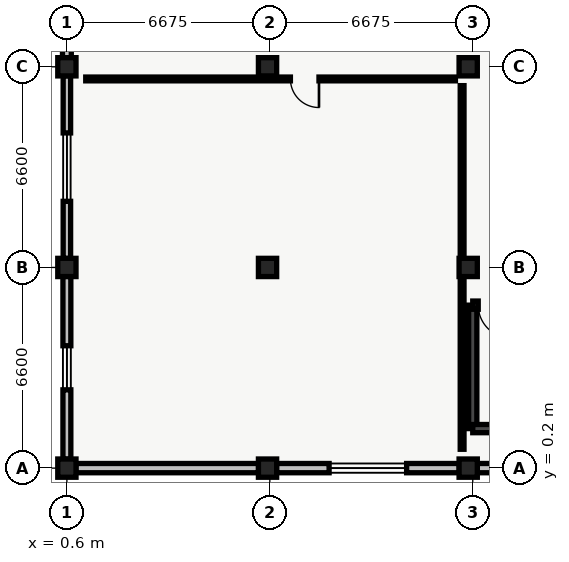
"""IFC4 building model, lengths in metres.
Left out: names, types, materials, properties, quantities, classifications, styles, units other than length and angle.
Written with IfcOpenShell. Run it as: python <this file> out.ifc"""

import sys

from ifc_helpers import new_model, si_unit, direction, frame, frame_2d, origin, origin_2d, place, context, subcontext, project, spatial, rectangle, extrude, element, fill, save


model = new_model("IFC4")
c1 = context("Model", 3, precision=1e-05, world=origin(), true_north=direction((0.0, 1.0)))
c2 = subcontext(c1, "Body", "Model", "MODEL_VIEW")
j1 = project(units=[si_unit("LENGTHUNIT", "METRE"), si_unit("PLANEANGLEUNIT", "RADIAN")], contexts=[c1])
p1 = place(None, origin())
s1 = spatial("IfcSite", under=j1, at=p1, CompositionType="ELEMENT")
p2 = place(p1, origin())
s2 = spatial("IfcBuilding", under=s1, at=p2, CompositionType="ELEMENT")
p3 = place(p2, frame((0.0, 0.0, 5.1)))
s3 = spatial("IfcBuildingStorey", under=s2, at=p3, CompositionType="ELEMENT", Elevation=5.1)
for number, where, z_axis, x_axis in (
    (1, (0.6, 0.2, 0.0), (0.0, 0.0, 1.0), (1.0, 0.0, 0.0)),
    (2, (0.6, 6.8, 0.0), (0.0, 0.0, 1.0), (1.0, 0.0, 0.0)),
    (3, (0.6, 13.4, 0.0), (0.0, 0.0, 1.0), (1.0, 0.0, 0.0)),
    (4, (7.2, 0.2, 0.0), (0.0, 0.0, 1.0), (1.0, 0.0, 0.0)),
    (5, (7.2, 6.8, 0.0), (0.0, 0.0, 1.0), (1.0, 0.0, 0.0)),
    (6, (7.2, 13.4, 0.0), (0.0, 0.0, 1.0), (1.0, 0.0, 0.0)),
    (7, (13.8, 0.2, 0.0), (0.0, 0.0, 1.0), (1.0, 0.0, 0.0)),
    (8, (13.8, 6.8, 0.0), (0.0, 0.0, 1.0), (1.0, 0.0, 0.0)),
    (9, (13.8, 13.4, 0.0), (0.0, 0.0, 1.0), (1.0, 0.0, 0.0)),
):
    element("IfcColumn", number, at=place(p3, frame(where, z_axis=z_axis, x_axis=x_axis)), inside=s3, PredefinedType="COLUMN", context=c2, shape_type="SweptSolid", body=[
        extrude(rectangle(XDim=0.6, YDim=0.6, at=origin_2d()), origin(), (0.0, 0.0, 1.0), 4.3),
    ])
p4 = place(p3, frame((0.6, 0.495, 0.0), z_axis=(0.0, 0.0, 1.0), x_axis=(0.0, 1.0, 0.0)))
e10 = element("IfcWall", 10, at=p4, inside=s3, PredefinedType="STANDARD", context=c2, shape_type="SweptSolid", body=[
    extrude(rectangle(XDim=6.01, YDim=0.26, at=frame_2d((3.005, 0.0))), origin(), (0.0, 0.0, 1.0), 3.785),
])
p5 = place(p4, frame((2.28, 0.0, 0.95)))
e11 = element("IfcOpeningElement", 11, at=p5, cuts=e10, PredefinedType="OPENING", context=c2, shape_type="SweptSolid", body=[
    extrude(rectangle(XDim=1.45, YDim=1.35, at=frame_2d((0.725, 0.675))), frame((0.0, 0.13, 0.0), z_axis=(0.0, -1.0, 0.0), x_axis=(1.0, 0.0, 0.0)), (0.0, 0.0, 1.0), 0.26),
])
p6 = place(p3, frame((0.6, 7.095, 0.0), z_axis=(0.0, 0.0, 1.0), x_axis=(0.0, 1.0, 0.0)))
e12 = element("IfcWall", 12, at=p6, inside=s3, PredefinedType="STANDARD", context=c2, shape_type="SweptSolid", body=[
    extrude(rectangle(XDim=6.01, YDim=0.245, at=frame_2d((3.005, 0.0))), origin(), (0.0, 0.0, 1.0), 3.785),
])
p7 = place(p6, frame((1.88, 0.0, 0.95)))
e13 = element("IfcOpeningElement", 13, at=p7, cuts=e12, PredefinedType="OPENING", context=c2, shape_type="SweptSolid", body=[
    extrude(rectangle(XDim=2.25, YDim=1.55, at=frame_2d((1.125, 0.775))), frame((0.0, 0.123, 0.0), z_axis=(0.0, -1.0, 0.0), x_axis=(1.0, 0.0, 0.0)), (0.0, 0.0, 1.0), 0.245),
])
p8 = place(p3, frame((0.6, 13.695, 0.0), z_axis=(0.0, 0.0, 1.0), x_axis=(0.0, 1.0, 0.0)))
e14 = element("IfcWall", 14, at=p8, inside=s3, PredefinedType="STANDARD", context=c2, shape_type="SweptSolid", body=[
    extrude(rectangle(XDim=6.01, YDim=0.29, at=frame_2d((3.005, 0.0))), origin(), (0.0, 0.0, 1.0), 3.785),
])
p9 = place(p8, frame((1.73, 0.0, 0.95)))
e15 = element("IfcOpeningElement", 15, at=p9, cuts=e14, PredefinedType="OPENING", context=c2, shape_type="SweptSolid", body=[
    extrude(rectangle(XDim=2.55, YDim=1.75, at=frame_2d((1.275, 0.875))), frame((0.0, 0.145, 0.0), z_axis=(0.0, -1.0, 0.0), x_axis=(1.0, 0.0, 0.0)), (0.0, 0.0, 1.0), 0.29),
])
p10 = place(p3, frame((20.105, 0.2, 0.0), z_axis=(0.0, 0.0, 1.0), x_axis=(-1.0, 0.0, 0.0)))
e16 = element("IfcWall", 16, at=p10, inside=s3, PredefinedType="STANDARD", context=c2, shape_type="SweptSolid", body=[
    extrude(rectangle(XDim=6.01, YDim=0.305, at=frame_2d((3.005, 0.0))), origin(), (0.0, 0.0, 1.0), 3.785),
])
p11 = place(p3, frame((13.505, 0.2, 0.0), z_axis=(0.0, 0.0, 1.0), x_axis=(-1.0, 0.0, 0.0)))
e17 = element("IfcWall", 17, at=p11, inside=s3, PredefinedType="STANDARD", context=c2, shape_type="SweptSolid", body=[
    extrude(rectangle(XDim=6.01, YDim=0.305, at=frame_2d((3.005, 0.0))), origin(), (0.0, 0.0, 1.0), 3.785),
])
p12 = place(p11, frame((1.73, 0.0, 0.95)))
e18 = element("IfcOpeningElement", 18, at=p12, cuts=e17, PredefinedType="OPENING", context=c2, shape_type="SweptSolid", body=[
    extrude(rectangle(XDim=2.55, YDim=1.75, at=frame_2d((1.275, 0.875))), frame((0.0, 0.152, 0.0), z_axis=(0.0, -1.0, 0.0), x_axis=(1.0, 0.0, 0.0)), (0.0, 0.0, 1.0), 0.305),
])
p13 = place(p3, frame((6.905, 0.2, 0.0), z_axis=(0.0, 0.0, 1.0), x_axis=(-1.0, 0.0, 0.0)))
e19 = element("IfcWall", 19, at=p13, inside=s3, PredefinedType="STANDARD", context=c2, shape_type="SweptSolid", body=[
    extrude(rectangle(XDim=6.01, YDim=0.305, at=frame_2d((3.005, 0.0))), origin(), (0.0, 0.0, 1.0), 3.785),
])
p14 = place(p3, frame((13.95, 1.5, 0.0), z_axis=(0.0, 0.0, 1.0), x_axis=(0.0, 1.0, 0.0)))
e20 = element("IfcWall", 20, at=p14, inside=s3, PredefinedType="SHEAR", context=c2, shape_type="SweptSolid", body=[
    extrude(rectangle(XDim=4.06, YDim=0.27, at=frame_2d((2.03, 0.0))), origin(), (0.0, 0.0, 1.0), 4.28),
])
p15 = place(p3, frame((13.95, 5.56, 0.0), z_axis=(0.0, 0.0, 1.0), x_axis=(1.0, 0.0, 0.0)))
e21 = element("IfcWall", 21, at=p15, inside=s3, PredefinedType="SHEAR", context=c2, shape_type="SweptSolid", body=[
    extrude(rectangle(XDim=7.47, YDim=0.27, at=frame_2d((3.735, 0.0))), origin(), (0.0, 0.0, 1.0), 4.28),
])
p16 = place(p15, frame((0.18, 0.0, 0.0)))
e22 = element("IfcOpeningElement", 22, at=p16, cuts=e21, PredefinedType="OPENING", context=c2, shape_type="SweptSolid", body=[
    extrude(rectangle(XDim=1.08, YDim=2.15, at=frame_2d((0.54, 1.075))), frame((0.0, 0.135, 0.0), z_axis=(0.0, -1.0, 0.0), x_axis=(1.0, 0.0, 0.0)), (0.0, 0.0, 1.0), 0.27),
])
p17 = place(p3, frame((21.42, 1.5, 0.0), z_axis=(0.0, 0.0, 1.0), x_axis=(-1.0, 0.0, 0.0)))
e23 = element("IfcWall", 23, at=p17, inside=s3, PredefinedType="SHEAR", context=c2, shape_type="SweptSolid", body=[
    extrude(rectangle(XDim=7.47, YDim=0.27, at=frame_2d((3.735, 0.0))), origin(), (0.0, 0.0, 1.0), 4.28),
])
p18 = place(p3, frame((13.6, 0.82, 0.0), z_axis=(0.0, 0.0, 1.0), x_axis=(0.0, 1.0, 0.0)))
e24 = element("IfcWall", 24, at=p18, inside=s3, PredefinedType="PARTITIONING", context=c2, shape_type="SweptSolid", body=[
    extrude(rectangle(XDim=11.96, YDim=0.125, at=frame_2d((5.98, 0.0))), origin(), (0.0, 0.0, 1.0), 3.635),
])
p19 = place(p3, frame((13.38, 13.0, 0.0), z_axis=(0.0, 0.0, 1.0), x_axis=(-1.0, 0.0, 0.0)))
e25 = element("IfcWall", 25, at=p19, inside=s3, PredefinedType="PARTITIONING", context=c2, shape_type="SweptSolid", body=[
    extrude(rectangle(XDim=12.16, YDim=0.125, at=frame_2d((6.08, 0.0))), origin(), (0.0, 0.0, 1.0), 3.95),
])
p20 = place(p19, frame((4.488, 0.0, 0.0)))
e26 = element("IfcOpeningElement", 26, at=p20, cuts=e25, PredefinedType="OPENING", context=c2, shape_type="SweptSolid", body=[
    extrude(rectangle(XDim=0.94, YDim=2.12, at=frame_2d((0.47, 1.06))), frame((0.0, 0.062, 0.0), z_axis=(0.0, -1.0, 0.0), x_axis=(1.0, 0.0, 0.0)), (0.0, 0.0, 1.0), 0.125),
])
p21 = place(p5, origin())
e27 = element("IfcWindow", 27, at=p21, inside=s3, PartitioningType="SINGLE_PANEL", PredefinedType="WINDOW", context=c2, shape_type="SweptSolid", body=[
    extrude(rectangle(XDim=1.45, YDim=1.35, at=frame_2d((0.725, 0.675))), frame((0.0, 0.03, 0.0), z_axis=(0.0, -1.0, 0.0), x_axis=(1.0, 0.0, 0.0)), (0.0, 0.0, 1.0), 0.06),
])
fill(e11, e27)
p22 = place(p7, origin())
e28 = element("IfcWindow", 28, at=p22, inside=s3, PartitioningType="SINGLE_PANEL", PredefinedType="WINDOW", context=c2, shape_type="SweptSolid", body=[
    extrude(rectangle(XDim=2.25, YDim=1.55, at=frame_2d((1.125, 0.775))), frame((0.0, 0.03, 0.0), z_axis=(0.0, -1.0, 0.0), x_axis=(1.0, 0.0, 0.0)), (0.0, 0.0, 1.0), 0.06),
])
fill(e13, e28)
p23 = place(p12, origin())
e29 = element("IfcWindow", 29, at=p23, inside=s3, PartitioningType="SINGLE_PANEL", PredefinedType="WINDOW", context=c2, shape_type="SweptSolid", body=[
    extrude(rectangle(XDim=2.55, YDim=1.75, at=frame_2d((1.275, 0.875))), frame((0.0, 0.03, 0.0), z_axis=(0.0, -1.0, 0.0), x_axis=(1.0, 0.0, 0.0)), (0.0, 0.0, 1.0), 0.06),
])
fill(e18, e29)
p24 = place(p16, origin())
e30 = element("IfcDoor", 30, at=p24, inside=s3, OperationType="SINGLE_SWING_RIGHT", PredefinedType="DOOR", context=c2, shape_type="SweptSolid", body=[
    extrude(rectangle(XDim=1.08, YDim=2.15, at=frame_2d((0.54, 1.075))), frame((0.0, 0.025, 0.0), z_axis=(0.0, -1.0, 0.0), x_axis=(1.0, 0.0, 0.0)), (0.0, 0.0, 1.0), 0.05),
])
fill(e22, e30)
p25 = place(p20, origin())
e31 = element("IfcDoor", 31, at=p25, inside=s3, OperationType="SINGLE_SWING_LEFT", PredefinedType="DOOR", context=c2, shape_type="SweptSolid", body=[
    extrude(rectangle(XDim=0.94, YDim=2.12, at=frame_2d((0.47, 1.06))), frame((0.0, 0.025, 0.0), z_axis=(0.0, -1.0, 0.0), x_axis=(1.0, 0.0, 0.0)), (0.0, 0.0, 1.0), 0.05),
])
fill(e26, e31)
save(model, sys.argv[1])
